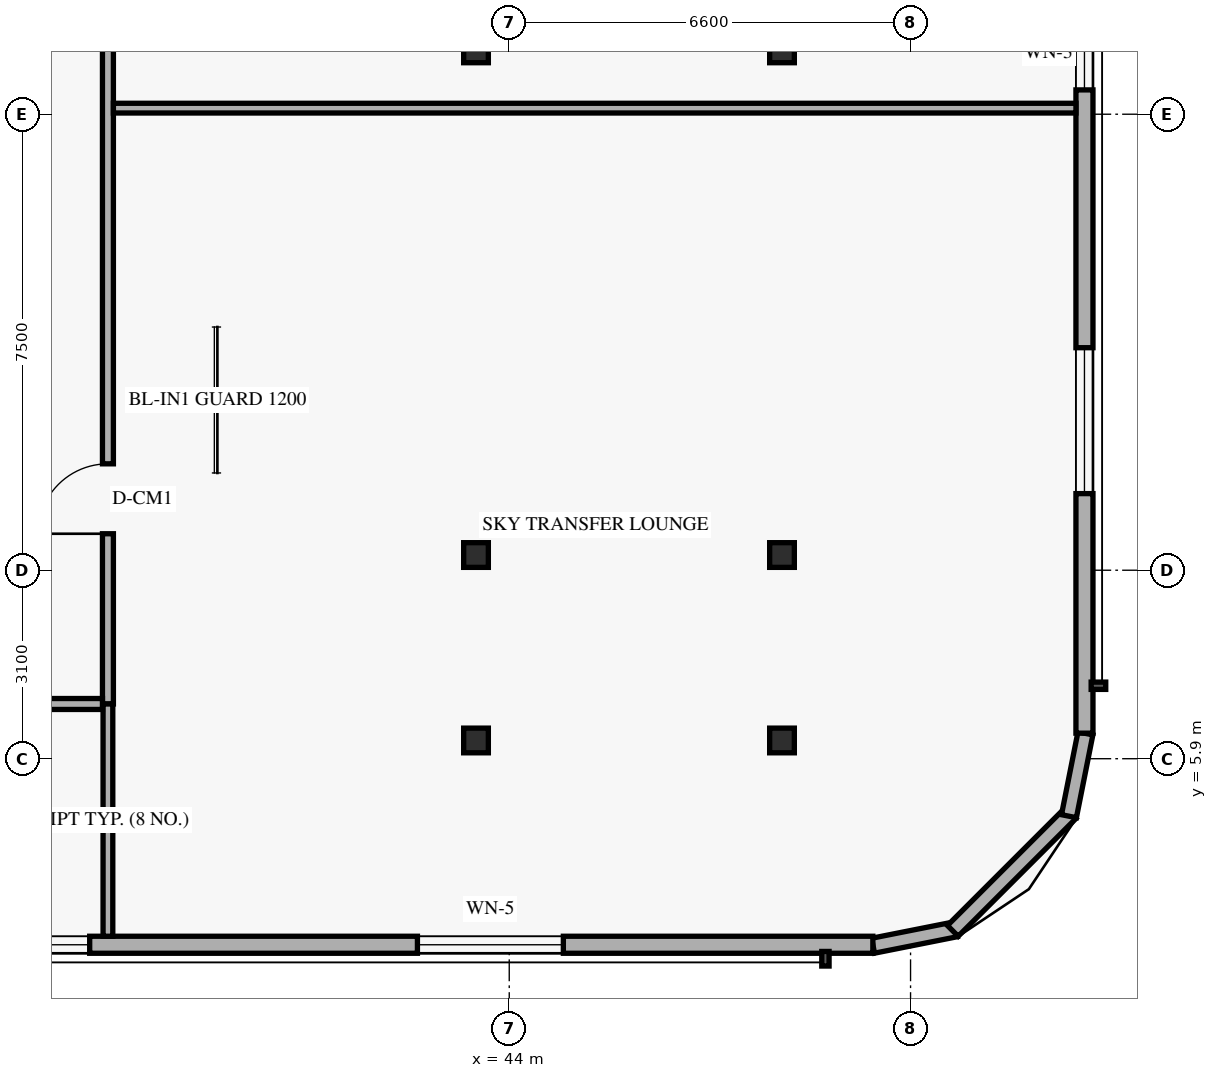
"""IFC4 building model, lengths in metres.
Left out: names, types, materials, properties, quantities, classifications, styles, units other than length and angle.
Written with IfcOpenShell. Run it as: python <this file> out.ifc"""

import sys

from ifc_helpers import new_model, si_unit, direction, frame, frame_2d, origin, origin_2d, place, context, subcontext, project, spatial, rectangle, hollow_rectangle, extrude, element, fill, save


model = new_model("IFC4")
c1 = context("Model", 3, precision=1e-05, world=origin(), true_north=direction((0.0, 1.0)))
c2 = subcontext(c1, "Body", "Model", "MODEL_VIEW")
j1 = project(units=[si_unit("LENGTHUNIT", "METRE"), si_unit("PLANEANGLEUNIT", "RADIAN")], contexts=[c1])
p1 = place(None, origin())
s1 = spatial("IfcSite", under=j1, at=p1, CompositionType="ELEMENT")
p2 = place(p1, origin())
s2 = spatial("IfcBuilding", under=s1, at=p2, CompositionType="ELEMENT")
p3 = place(p2, frame((0.0, 0.0, 98.4)))
s3 = spatial("IfcBuildingStorey", under=s2, at=p3, CompositionType="ELEMENT", Elevation=98.4)
for number, where, z_axis, x_axis in (
    (1, (43.38, 6.2, 0.0), (0.035, 0.0, 0.999), (0.0, 1.0, 0.0)),
    (2, (43.38, 9.25, 0.0), (0.035, 0.0, 0.999), (0.0, 1.0, 0.0)),
    (3, (43.38, 17.55, 0.0), (0.035, 0.0, 0.999), (0.0, 1.0, 0.0)),
):
    element("IfcColumn", number, at=place(p3, frame(where, z_axis=z_axis, x_axis=x_axis)), inside=s3, PredefinedType="COLUMN", context=c2, shape_type="SweptSolid", body=[
        extrude(hollow_rectangle(XDim=0.406, YDim=0.406, WallThickness=0.016, at=origin_2d()), origin(), (0.0, 0.0, 1.0), 4.203),
    ])
for number, where, z_axis, x_axis in (
    (4, (48.364, 6.2, 0.0), (0.058, 0.0, 0.998), (0.0, 1.0, 0.0)),
    (5, (48.364, 9.25, 0.0), (0.058, 0.0, 0.998), (0.0, 1.0, 0.0)),
    (6, (48.364, 17.55, 0.0), (0.058, 0.0, 0.998), (0.0, 1.0, 0.0)),
):
    element("IfcColumn", number, at=place(p3, frame(where, z_axis=z_axis, x_axis=x_axis)), inside=s3, PredefinedType="COLUMN", context=c2, shape_type="SweptSolid", body=[
        extrude(hollow_rectangle(XDim=0.406, YDim=0.406, WallThickness=0.016, at=origin_2d()), origin(), (0.0, 0.0, 1.0), 4.207),
    ])
p4 = place(p3, frame((49.983, 2.824, 0.0), z_axis=(0.0, 0.0, 1.0), x_axis=(0.980809899341, 0.19496651342, 0.0)))
e7 = element("IfcWall", 7, at=p4, inside=s3, PredefinedType="SOLIDWALL", context=c2, shape_type="SweptSolid", body=[
    extrude(rectangle(XDim=1.389, YDim=0.25, at=frame_2d((0.694, 0.0))), origin(), (0.0, 0.0, 1.0), 3.96),
])
p5 = place(p3, frame((51.295, 3.068, 0.0), z_axis=(0.0, 0.0, 1.0), x_axis=(0.707151344399, 0.707062215165, 0.0)))
e8 = element("IfcWall", 8, at=p5, inside=s3, PredefinedType="SOLIDWALL", context=c2, shape_type="SweptSolid", body=[
    extrude(rectangle(XDim=2.739, YDim=0.25, at=frame_2d((1.37, 0.0))), origin(), (0.0, 0.0, 1.0), 3.96),
])
p6 = place(p3, frame((53.205, 4.955, 0.0), z_axis=(0.0, 0.0, 1.0), x_axis=(0.195000137217, 0.980803214965, 0.0)))
e9 = element("IfcWall", 9, at=p6, inside=s3, PredefinedType="SOLIDWALL", context=c2, shape_type="SweptSolid", body=[
    extrude(rectangle(XDim=1.388, YDim=0.25, at=frame_2d((0.694, 0.0))), origin(), (0.0, 0.0, 1.0), 3.96),
])
p7 = place(p3, frame((34.4, 2.84, 0.0), z_axis=(0.0, 0.0, 1.0), x_axis=(1.0, 0.0, 0.0)))
e10 = element("IfcWall", 10, at=p7, inside=s3, PredefinedType="SOLIDWALL", context=c2, shape_type="SweptSolid", body=[
    extrude(rectangle(XDim=15.58, YDim=0.28, at=frame_2d((7.79, 0.0))), origin(), (0.0, 0.0, 1.0), 3.96),
])
p8 = place(p7, frame((0.3, 0.0, 0.85)))
e11 = element("IfcOpeningElement", 11, at=p8, cuts=e10, PredefinedType="OPENING", context=c2, shape_type="SweptSolid", body=[
    extrude(rectangle(XDim=2.4, YDim=1.9, at=frame_2d((1.2, 0.95))), frame((0.0, 0.15, 0.0), z_axis=(0.0, -1.0, 0.0), x_axis=(1.0, 0.0, 0.0)), (0.0, 0.0, 1.0), 0.3),
])
p9 = place(p7, frame((8.09, 0.0, 0.85)))
e12 = element("IfcOpeningElement", 12, at=p9, cuts=e10, PredefinedType="OPENING", context=c2, shape_type="SweptSolid", body=[
    extrude(rectangle(XDim=2.4, YDim=1.9, at=frame_2d((1.2, 0.95))), frame((0.0, 0.15, 0.0), z_axis=(0.0, -1.0, 0.0), x_axis=(1.0, 0.0, 0.0)), (0.0, 0.0, 1.0), 0.3),
])
p10 = place(p3, frame((53.46, 6.32, 0.0), z_axis=(0.0, 0.0, 1.0), x_axis=(0.0, 1.0, 0.0)))
e13 = element("IfcWall", 13, at=p10, inside=s3, PredefinedType="SOLIDWALL", context=c2, shape_type="SweptSolid", body=[
    extrude(rectangle(XDim=12.08, YDim=0.28, at=frame_2d((6.04, 0.0))), origin(), (0.0, 0.0, 1.0), 3.96),
])
p11 = place(p10, frame((3.94, 0.0, 0.85)))
e14 = element("IfcOpeningElement", 14, at=p11, cuts=e13, PredefinedType="OPENING", context=c2, shape_type="SweptSolid", body=[
    extrude(rectangle(XDim=2.4, YDim=1.9, at=frame_2d((1.2, 0.95))), frame((0.0, 0.15, 0.0), z_axis=(0.0, -1.0, 0.0), x_axis=(1.0, 0.0, 0.0)), (0.0, 0.0, 1.0), 0.3),
])
p12 = place(p10, frame((10.58, 0.0, 0.85)))
e15 = element("IfcOpeningElement", 15, at=p12, cuts=e13, PredefinedType="OPENING", context=c2, shape_type="SweptSolid", body=[
    extrude(rectangle(XDim=1.2, YDim=1.5, at=frame_2d((0.6, 0.75))), frame((0.0, 0.15, 0.0), z_axis=(0.0, -1.0, 0.0), x_axis=(1.0, 0.0, 0.0)), (0.0, 0.0, 1.0), 0.3),
])
p13 = place(p3, frame((37.4, 6.8, 0.0), z_axis=(0.0, 0.0, 1.0), x_axis=(0.0, 1.0, 0.0)))
e16 = element("IfcWall", 16, at=p13, inside=s3, PredefinedType="STANDARD", context=c2, shape_type="SweptSolid", body=[
    extrude(rectangle(XDim=34.4, YDim=0.18, at=frame_2d((17.2, 0.0))), origin(), (0.0, 0.0, 1.0), 3.331),
])
p14 = place(p13, frame((25.29, 0.0, 0.0)))
e17 = element("IfcOpeningElement", 17, at=p14, cuts=e16, PredefinedType="OPENING", context=c2, shape_type="SweptSolid", body=[
    extrude(rectangle(XDim=0.92, YDim=2.14, at=frame_2d((0.46, 1.07))), frame((0.0, 0.1, 0.0), z_axis=(0.0, -1.0, 0.0), x_axis=(1.0, 0.0, 0.0)), (0.0, 0.0, 1.0), 0.2),
])
p15 = place(p13, frame((32.32, 0.0, 0.0)))
e18 = element("IfcOpeningElement", 18, at=p15, cuts=e16, PredefinedType="OPENING", context=c2, shape_type="SweptSolid", body=[
    extrude(rectangle(XDim=0.95, YDim=2.14, at=frame_2d((0.475, 1.07))), frame((0.0, 0.1, 0.0), z_axis=(0.0, -1.0, 0.0), x_axis=(1.0, 0.0, 0.0)), (0.0, 0.0, 1.0), 0.2),
])
p16 = place(p13, frame((2.8, 0.0, 0.0)))
e19 = element("IfcOpeningElement", 19, at=p16, cuts=e16, PredefinedType="OPENING", context=c2, shape_type="SweptSolid", body=[
    extrude(rectangle(XDim=1.15, YDim=2.15, at=frame_2d((0.575, 1.075))), frame((0.0, 0.1, 0.0), z_axis=(0.0, -1.0, 0.0), x_axis=(1.0, 0.0, 0.0)), (0.0, 0.0, 1.0), 0.2),
])
p17 = place(p13, frame((21.6, 0.0, 0.0)))
e20 = element("IfcOpeningElement", 20, at=p17, cuts=e16, PredefinedType="OPENING", context=c2, shape_type="SweptSolid", body=[
    extrude(rectangle(XDim=1.15, YDim=2.15, at=frame_2d((0.575, 1.075))), frame((0.0, 0.1, 0.0), z_axis=(0.0, -1.0, 0.0), x_axis=(1.0, 0.0, 0.0)), (0.0, 0.0, 1.0), 0.2),
])
p18 = place(p3, frame((37.4, 2.98, 0.0), z_axis=(0.0, 0.0, 1.0), x_axis=(0.0, 1.0, 0.0)))
e21 = element("IfcWall", 21, at=p18, inside=s3, PredefinedType="PARTITIONING", context=c2, shape_type="SweptSolid", body=[
    extrude(rectangle(XDim=3.82, YDim=0.16, at=frame_2d((1.91, 0.0))), origin(), (0.0, 0.0, 1.0), 3.409),
])
p19 = place(p3, frame((37.49, 16.6, 0.0), z_axis=(0.0, 0.0, 1.0), x_axis=(1.0, 0.0, 0.0)))
e22 = element("IfcWall", 22, at=p19, inside=s3, PredefinedType="PARTITIONING", context=c2, shape_type="SweptSolid", body=[
    extrude(rectangle(XDim=15.83, YDim=0.16, at=frame_2d((7.915, 0.0))), origin(), (0.0, 0.0, 1.0), 3.331),
])
p20 = place(p3, frame((21.74, 6.8, 0.0), z_axis=(0.0, 0.0, 1.0), x_axis=(1.0, 0.0, 0.0)))
e23 = element("IfcWall", 23, at=p20, inside=s3, PredefinedType="STANDARD", context=c2, shape_type="SweptSolid", body=[
    extrude(rectangle(XDim=15.57, YDim=0.18, at=frame_2d((7.785, 0.0))), origin(), (0.0, 0.0, 1.0), 3.331),
])
p21 = place(p20, frame((5.41, 0.0, 0.0)))
e24 = element("IfcOpeningElement", 24, at=p21, cuts=e23, PredefinedType="OPENING", context=c2, shape_type="SweptSolid", body=[
    extrude(rectangle(XDim=0.95, YDim=2.15, at=frame_2d((0.475, 1.075))), frame((0.0, 0.1, 0.0), z_axis=(0.0, -1.0, 0.0), x_axis=(1.0, 0.0, 0.0)), (0.0, 0.0, 1.0), 0.2),
])
p22 = place(p8, origin())
e25 = element("IfcWindow", 25, at=p22, inside=s3, PartitioningType="SINGLE_PANEL", PredefinedType="WINDOW", context=c2, shape_type="SweptSolid", body=[
    extrude(rectangle(XDim=2.4, YDim=1.9, at=frame_2d((1.2, 0.95))), frame((0.0, 0.03, 0.0), z_axis=(0.0, -1.0, 0.0), x_axis=(1.0, 0.0, 0.0)), (0.0, 0.0, 1.0), 0.06),
])
fill(e11, e25)
p23 = place(p9, origin())
e26 = element("IfcWindow", 26, at=p23, inside=s3, PartitioningType="SINGLE_PANEL", PredefinedType="WINDOW", context=c2, shape_type="SweptSolid", body=[
    extrude(rectangle(XDim=2.4, YDim=1.9, at=frame_2d((1.2, 0.95))), frame((0.0, 0.03, 0.0), z_axis=(0.0, -1.0, 0.0), x_axis=(1.0, 0.0, 0.0)), (0.0, 0.0, 1.0), 0.06),
])
fill(e12, e26)
p24 = place(p11, origin())
e27 = element("IfcWindow", 27, at=p24, inside=s3, PartitioningType="SINGLE_PANEL", PredefinedType="WINDOW", context=c2, shape_type="SweptSolid", body=[
    extrude(rectangle(XDim=2.4, YDim=1.9, at=frame_2d((1.2, 0.95))), frame((0.0, 0.03, 0.0), z_axis=(0.0, -1.0, 0.0), x_axis=(1.0, 0.0, 0.0)), (0.0, 0.0, 1.0), 0.06),
])
fill(e14, e27)
p25 = place(p12, origin())
e28 = element("IfcWindow", 28, at=p25, inside=s3, PartitioningType="SINGLE_PANEL", PredefinedType="WINDOW", context=c2, shape_type="SweptSolid", body=[
    extrude(rectangle(XDim=1.2, YDim=1.5, at=frame_2d((0.6, 0.75))), frame((0.0, 0.03, 0.0), z_axis=(0.0, -1.0, 0.0), x_axis=(1.0, 0.0, 0.0)), (0.0, 0.0, 1.0), 0.06),
])
fill(e15, e28)
p26 = place(p16, origin())
e29 = element("IfcDoor", 29, at=p26, inside=s3, OperationType="SINGLE_SWING_LEFT", PredefinedType="DOOR", context=c2, shape_type="SweptSolid", body=[
    extrude(rectangle(XDim=1.15, YDim=2.15, at=frame_2d((0.575, 1.075))), frame((0.0, 0.025, 0.0), z_axis=(0.0, -1.0, 0.0), x_axis=(1.0, 0.0, 0.0)), (0.0, 0.0, 1.0), 0.05),
])
fill(e19, e29)
save(model, sys.argv[1])
